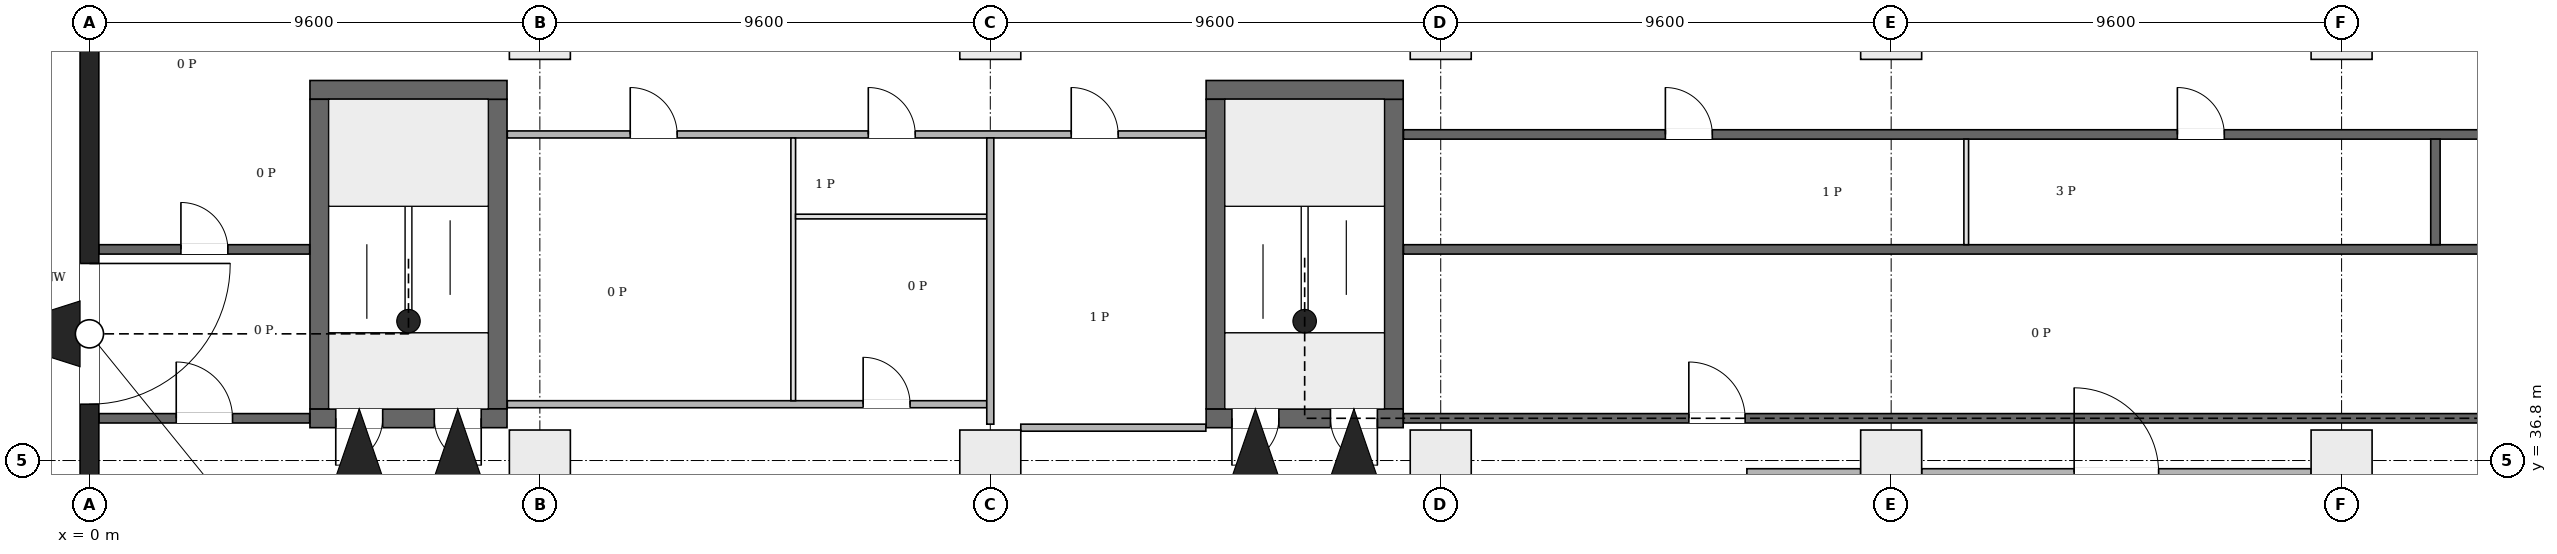
"""IFC4 building model, lengths in metres.
Left out: names, types, materials, properties, quantities, classifications, styles, units other than length and angle.
Written with IfcOpenShell. Run it as: python <this file> out.ifc"""

import sys

from ifc_helpers import new_model, si_unit, direction, frame, frame_2d, origin, origin_2d, place, context, subcontext, project, spatial, rectangle, extrude, element, fill, save


model = new_model("IFC4")
c1 = context("Model", 3, precision=1e-05, world=origin(), true_north=direction((0.0, 1.0)))
c2 = subcontext(c1, "Body", "Model", "MODEL_VIEW")
j1 = project(units=[si_unit("LENGTHUNIT", "METRE"), si_unit("PLANEANGLEUNIT", "RADIAN")], contexts=[c1])
p1 = place(None, origin())
s1 = spatial("IfcSite", under=j1, at=p1, CompositionType="ELEMENT")
p2 = place(p1, origin())
s2 = spatial("IfcBuilding", under=s1, at=p2, CompositionType="ELEMENT")
p3 = place(p2, origin())
s3 = spatial("IfcBuildingStorey", under=s2, at=p3, CompositionType="ELEMENT", Elevation=0.0)
p4 = place(p3, frame((0.0, -0.2, 0.0), z_axis=(0.0, 0.0, 1.0), x_axis=(0.0, 1.0, 0.0)))
e1 = element("IfcWall", 1, at=p4, inside=s3, PredefinedType="SHEAR", context=c2, shape_type="SweptSolid", body=[
    extrude(rectangle(XDim=46.88, YDim=0.4, at=frame_2d((23.44, 0.0))), origin(), (0.0, 0.0, 1.0), 6.5),
])
p5 = place(p4, frame((7.125, 0.0, 0.0)))
e2 = element("IfcOpeningElement", 2, at=p5, cuts=e1, PredefinedType="OPENING", context=c2, shape_type="SweptSolid", body=[
    extrude(rectangle(XDim=3.0, YDim=2.4, at=frame_2d((1.5, 1.2))), frame((0.0, 0.21, 0.0), z_axis=(0.0, -1.0, 0.0), x_axis=(1.0, 0.0, 0.0)), (0.0, 0.0, 1.0), 0.42),
])
p6 = place(p4, frame((38.2, 0.0, 0.0)))
e3 = element("IfcOpeningElement", 3, at=p6, cuts=e1, PredefinedType="OPENING", context=c2, shape_type="SweptSolid", body=[
    extrude(rectangle(XDim=3.0, YDim=2.4, at=frame_2d((1.5, 1.2))), frame((0.0, 0.21, 0.0), z_axis=(0.0, -1.0, 0.0), x_axis=(1.0, 0.0, 0.0)), (0.0, 0.0, 1.0), 0.42),
])
p7 = place(p3, frame((4.7, 37.7, 0.0), z_axis=(0.0, 0.0, 1.0), x_axis=(1.0, 0.0, 0.0)))
e4 = element("IfcWall", 4, at=p7, inside=s3, PredefinedType="SHEAR", context=c2, shape_type="SweptSolid", body=[
    extrude(rectangle(XDim=4.2, YDim=0.4, at=frame_2d((2.1, 0.0))), origin(), (0.0, 0.0, 1.0), 6.5),
])
p8 = place(p7, frame((0.55, 0.0, 0.0)))
e5 = element("IfcOpeningElement", 5, at=p8, cuts=e4, PredefinedType="OPENING", context=c2, shape_type="SweptSolid", body=[
    extrude(rectangle(XDim=1.0, YDim=2.1, at=frame_2d((0.5, 1.05))), frame((0.0, 0.21, 0.0), z_axis=(0.0, -1.0, 0.0), x_axis=(1.0, 0.0, 0.0)), (0.0, 0.0, 1.0), 0.42),
])
p9 = place(p7, frame((2.65, 0.0, 0.0)))
e6 = element("IfcOpeningElement", 6, at=p9, cuts=e4, PredefinedType="OPENING", context=c2, shape_type="SweptSolid", body=[
    extrude(rectangle(XDim=1.0, YDim=2.1, at=frame_2d((0.5, 1.05))), frame((0.0, 0.21, 0.0), z_axis=(0.0, -1.0, 0.0), x_axis=(1.0, 0.0, 0.0)), (0.0, 0.0, 1.0), 0.42),
])
p10 = place(p3, frame((4.7, 44.7, 0.0), z_axis=(0.0, 0.0, 1.0), x_axis=(1.0, 0.0, 0.0)))
e7 = element("IfcWall", 7, at=p10, inside=s3, PredefinedType="SHEAR", context=c2, shape_type="SweptSolid", body=[
    extrude(rectangle(XDim=4.2, YDim=0.4, at=frame_2d((2.1, 0.0))), origin(), (0.0, 0.0, 1.0), 6.5),
])
for number, where, z_axis, x_axis in (
    (8, (4.9, 37.9, 0.0), (0.0, 0.0, 1.0), (0.0, 1.0, 0.0)),
    (9, (8.7, 37.9, 0.0), (0.0, 0.0, 1.0), (0.0, 1.0, 0.0)),
):
    element("IfcWall", number, at=place(p3, frame(where, z_axis=z_axis, x_axis=x_axis)), inside=s3, PredefinedType="SHEAR", context=c2, shape_type="SweptSolid", body=[
        extrude(rectangle(XDim=6.6, YDim=0.4, at=frame_2d((3.3, 0.0))), origin(), (0.0, 0.0, 1.0), 6.5),
    ])
p11 = place(p3, frame((23.8, 37.7, 0.0), z_axis=(0.0, 0.0, 1.0), x_axis=(1.0, 0.0, 0.0)))
e10 = element("IfcWall", 10, at=p11, inside=s3, PredefinedType="SHEAR", context=c2, shape_type="SweptSolid", body=[
    extrude(rectangle(XDim=4.2, YDim=0.4, at=frame_2d((2.1, 0.0))), origin(), (0.0, 0.0, 1.0), 6.5),
])
p12 = place(p11, frame((0.55, 0.0, 0.0)))
e11 = element("IfcOpeningElement", 11, at=p12, cuts=e10, PredefinedType="OPENING", context=c2, shape_type="SweptSolid", body=[
    extrude(rectangle(XDim=1.0, YDim=2.1, at=frame_2d((0.5, 1.05))), frame((0.0, 0.21, 0.0), z_axis=(0.0, -1.0, 0.0), x_axis=(1.0, 0.0, 0.0)), (0.0, 0.0, 1.0), 0.42),
])
p13 = place(p11, frame((2.65, 0.0, 0.0)))
e12 = element("IfcOpeningElement", 12, at=p13, cuts=e10, PredefinedType="OPENING", context=c2, shape_type="SweptSolid", body=[
    extrude(rectangle(XDim=1.0, YDim=2.1, at=frame_2d((0.5, 1.05))), frame((0.0, 0.21, 0.0), z_axis=(0.0, -1.0, 0.0), x_axis=(1.0, 0.0, 0.0)), (0.0, 0.0, 1.0), 0.42),
])
p14 = place(p3, frame((23.8, 44.7, 0.0), z_axis=(0.0, 0.0, 1.0), x_axis=(1.0, 0.0, 0.0)))
e13 = element("IfcWall", 13, at=p14, inside=s3, PredefinedType="SHEAR", context=c2, shape_type="SweptSolid", body=[
    extrude(rectangle(XDim=4.2, YDim=0.4, at=frame_2d((2.1, 0.0))), origin(), (0.0, 0.0, 1.0), 6.5),
])
for number, where, z_axis, x_axis in (
    (14, (24.0, 37.9, 0.0), (0.0, 0.0, 1.0), (0.0, 1.0, 0.0)),
    (15, (27.8, 37.9, 0.0), (0.0, 0.0, 1.0), (0.0, 1.0, 0.0)),
):
    element("IfcWall", number, at=place(p3, frame(where, z_axis=z_axis, x_axis=x_axis)), inside=s3, PredefinedType="SHEAR", context=c2, shape_type="SweptSolid", body=[
        extrude(rectangle(XDim=6.6, YDim=0.4, at=frame_2d((3.3, 0.0))), origin(), (0.0, 0.0, 1.0), 6.5),
    ])
for number, where, z_axis, x_axis in (
    (16, (9.6, 36.8, 0.0), (0.0, 0.0, 1.0), (1.0, 0.0, 0.0)),
    (17, (19.2, 36.8, 0.0), (0.0, 0.0, 1.0), (1.0, 0.0, 0.0)),
    (18, (28.8, 36.8, 0.0), (0.0, 0.0, 1.0), (1.0, 0.0, 0.0)),
    (19, (38.4, 36.8, 0.0), (0.0, 0.0, 1.0), (1.0, 0.0, 0.0)),
    (20, (48.0, 36.8, 0.0), (0.0, 0.0, 1.0), (1.0, 0.0, 0.0)),
    (21, (9.6, 46.0, 0.0), (0.0, 0.0, 1.0), (1.0, 0.0, 0.0)),
    (22, (19.2, 46.0, 0.0), (0.0, 0.0, 1.0), (1.0, 0.0, 0.0)),
    (23, (28.8, 46.0, 0.0), (0.0, 0.0, 1.0), (1.0, 0.0, 0.0)),
    (24, (38.4, 46.0, 0.0), (0.0, 0.0, 1.0), (1.0, 0.0, 0.0)),
    (25, (48.0, 46.0, 0.0), (0.0, 0.0, 1.0), (1.0, 0.0, 0.0)),
):
    element("IfcColumn", number, at=place(p3, frame(where, z_axis=z_axis, x_axis=x_axis)), inside=s3, PredefinedType="COLUMN", context=c2, shape_type="SweptSolid", body=[
        extrude(rectangle(XDim=1.3, YDim=1.3, at=origin_2d()), origin(), (0.0, 0.0, 1.0), 6.5),
    ])
p15 = place(p3, frame((0.206, 37.7, 0.0), z_axis=(0.0, 0.0, 1.0), x_axis=(1.0, 0.0, 0.0)))
e26 = element("IfcWall", 26, at=p15, inside=s3, PredefinedType="PARTITIONING", context=c2, shape_type="SweptSolid", body=[
    extrude(rectangle(XDim=4.488, YDim=0.2, at=frame_2d((2.244, 0.0))), origin(), (0.0, 0.0, 1.0), 6.15),
])
p16 = place(p15, frame((1.644, 0.0, 0.0)))
e27 = element("IfcOpeningElement", 27, at=p16, cuts=e26, PredefinedType="OPENING", context=c2, shape_type="SweptSolid", body=[
    extrude(rectangle(XDim=1.2, YDim=2.1, at=frame_2d((0.6, 1.05))), frame((0.0, 0.11, 0.0), z_axis=(0.0, -1.0, 0.0), x_axis=(1.0, 0.0, 0.0)), (0.0, 0.0, 1.0), 0.22),
])
p17 = place(p3, frame((0.206, 41.3, 0.0), z_axis=(0.0, 0.0, 1.0), x_axis=(1.0, 0.0, 0.0)))
e28 = element("IfcWall", 28, at=p17, inside=s3, PredefinedType="PARTITIONING", context=c2, shape_type="SweptSolid", body=[
    extrude(rectangle(XDim=4.488, YDim=0.2, at=frame_2d((2.244, 0.0))), origin(), (0.0, 0.0, 1.0), 6.15),
])
p18 = place(p17, frame((1.744, 0.0, 0.0)))
e29 = element("IfcOpeningElement", 29, at=p18, cuts=e28, PredefinedType="OPENING", context=c2, shape_type="SweptSolid", body=[
    extrude(rectangle(XDim=1.0, YDim=2.1, at=frame_2d((0.5, 1.05))), frame((0.0, 0.11, 0.0), z_axis=(0.0, -1.0, 0.0), x_axis=(1.0, 0.0, 0.0)), (0.0, 0.0, 1.0), 0.22),
])
p19 = place(p3, frame((8.906, 38.0, 0.0), z_axis=(0.0, 0.0, 1.0), x_axis=(1.0, 0.0, 0.0)))
e30 = element("IfcWall", 30, at=p19, inside=s3, PredefinedType="PARTITIONING", context=c2, shape_type="SweptSolid", body=[
    extrude(rectangle(XDim=10.219, YDim=0.15, at=frame_2d((5.109, 0.0))), origin(), (0.0, 0.0, 1.0), 6.15),
])
p20 = place(p19, frame((7.584, 0.0, 0.0)))
e31 = element("IfcOpeningElement", 31, at=p20, cuts=e30, PredefinedType="OPENING", context=c2, shape_type="SweptSolid", body=[
    extrude(rectangle(XDim=1.0, YDim=2.1, at=frame_2d((0.5, 1.05))), frame((0.0, 0.085, 0.0), z_axis=(0.0, -1.0, 0.0), x_axis=(1.0, 0.0, 0.0)), (0.0, 0.0, 1.0), 0.17),
])
p21 = place(p3, frame((8.906, 43.75, 0.0), z_axis=(0.0, 0.0, 1.0), x_axis=(1.0, 0.0, 0.0)))
e32 = element("IfcWall", 32, at=p21, inside=s3, PredefinedType="PARTITIONING", context=c2, shape_type="SweptSolid", body=[
    extrude(rectangle(XDim=14.888, YDim=0.15, at=frame_2d((7.444, 0.0))), origin(), (0.0, 0.0, 1.0), 6.15),
])
p22 = place(p21, frame((2.62, 0.0, 0.0)))
e33 = element("IfcOpeningElement", 33, at=p22, cuts=e32, PredefinedType="OPENING", context=c2, shape_type="SweptSolid", body=[
    extrude(rectangle(XDim=1.0, YDim=2.1, at=frame_2d((0.5, 1.05))), frame((0.0, 0.085, 0.0), z_axis=(0.0, -1.0, 0.0), x_axis=(1.0, 0.0, 0.0)), (0.0, 0.0, 1.0), 0.17),
])
p23 = place(p21, frame((12.019, 0.0, 0.0)))
e34 = element("IfcOpeningElement", 34, at=p23, cuts=e32, PredefinedType="OPENING", context=c2, shape_type="SweptSolid", body=[
    extrude(rectangle(XDim=1.0, YDim=2.1, at=frame_2d((0.5, 1.05))), frame((0.0, 0.085, 0.0), z_axis=(0.0, -1.0, 0.0), x_axis=(1.0, 0.0, 0.0)), (0.0, 0.0, 1.0), 0.17),
])
p24 = place(p21, frame((7.694, 0.0, 0.0)))
e35 = element("IfcOpeningElement", 35, at=p24, cuts=e32, PredefinedType="OPENING", context=c2, shape_type="SweptSolid", body=[
    extrude(rectangle(XDim=1.0, YDim=2.1, at=frame_2d((0.5, 1.05))), frame((0.0, 0.085, 0.0), z_axis=(0.0, -1.0, 0.0), x_axis=(1.0, 0.0, 0.0)), (0.0, 0.0, 1.0), 0.17),
])
p25 = place(p3, frame((15.0, 38.075, 0.0), z_axis=(0.0, 0.0, 1.0), x_axis=(0.0, 1.0, 0.0)))
e36 = element("IfcWall", 36, at=p25, inside=s3, PredefinedType="PARTITIONING", context=c2, shape_type="SweptSolid", body=[
    extrude(rectangle(XDim=5.6, YDim=0.1, at=frame_2d((2.8, 0.0))), origin(), (0.0, 0.0, 1.0), 6.15),
])
p26 = place(p3, frame((15.05, 42.0, 0.0), z_axis=(0.0, 0.0, 1.0), x_axis=(1.0, 0.0, 0.0)))
e37 = element("IfcWall", 37, at=p26, inside=s3, PredefinedType="PARTITIONING", context=c2, shape_type="SweptSolid", body=[
    extrude(rectangle(XDim=4.075, YDim=0.1, at=frame_2d((2.038, 0.0))), origin(), (0.0, 0.0, 1.0), 6.15),
])
p27 = place(p3, frame((19.2, 37.575, 0.0), z_axis=(0.0, 0.0, 1.0), x_axis=(0.0, 1.0, 0.0)))
e38 = element("IfcWall", 38, at=p27, inside=s3, PredefinedType="PARTITIONING", context=c2, shape_type="SweptSolid", body=[
    extrude(rectangle(XDim=6.1, YDim=0.15, at=frame_2d((3.05, 0.0))), origin(), (0.0, 0.0, 1.0), 5.75),
])
p28 = place(p3, frame((19.85, 37.5, 0.0), z_axis=(0.0, 0.0, 1.0), x_axis=(1.0, 0.0, 0.0)))
e39 = element("IfcWall", 39, at=p28, inside=s3, PredefinedType="PARTITIONING", context=c2, shape_type="SweptSolid", body=[
    extrude(rectangle(XDim=3.944, YDim=0.15, at=frame_2d((1.972, 0.0))), origin(), (0.0, 0.0, 1.0), 6.15),
])
p29 = place(p3, frame((28.006, 37.7, 0.0), z_axis=(0.0, 0.0, 1.0), x_axis=(1.0, 0.0, 0.0)))
e40 = element("IfcWall", 40, at=p29, inside=s3, PredefinedType="PARTITIONING", context=c2, shape_type="SweptSolid", body=[
    extrude(rectangle(XDim=29.388, YDim=0.2, at=frame_2d((14.694, 0.0))), origin(), (0.0, 0.0, 1.0), 6.15),
])
p30 = place(p29, frame((24.106, 0.0, 0.0)))
e41 = element("IfcOpeningElement", 41, at=p30, cuts=e40, PredefinedType="OPENING", context=c2, shape_type="SweptSolid", body=[
    extrude(rectangle(XDim=1.0, YDim=2.1, at=frame_2d((0.5, 1.05))), frame((0.0, 0.11, 0.0), z_axis=(0.0, -1.0, 0.0), x_axis=(1.0, 0.0, 0.0)), (0.0, 0.0, 1.0), 0.22),
])
p31 = place(p29, frame((6.082, 0.0, 0.0)))
e42 = element("IfcOpeningElement", 42, at=p31, cuts=e40, PredefinedType="OPENING", context=c2, shape_type="SweptSolid", body=[
    extrude(rectangle(XDim=1.2, YDim=2.1, at=frame_2d((0.6, 1.05))), frame((0.0, 0.11, 0.0), z_axis=(0.0, -1.0, 0.0), x_axis=(1.0, 0.0, 0.0)), (0.0, 0.0, 1.0), 0.22),
])
p32 = place(p3, frame((28.006, 41.3, 0.0), z_axis=(0.0, 0.0, 1.0), x_axis=(1.0, 0.0, 0.0)))
e43 = element("IfcWall", 43, at=p32, inside=s3, PredefinedType="PARTITIONING", context=c2, shape_type="SweptSolid", body=[
    extrude(rectangle(XDim=29.388, YDim=0.2, at=frame_2d((14.694, 0.0))), origin(), (0.0, 0.0, 1.0), 6.15),
])
p33 = place(p3, frame((28.006, 43.75, 0.0), z_axis=(0.0, 0.0, 1.0), x_axis=(1.0, 0.0, 0.0)))
e44 = element("IfcWall", 44, at=p33, inside=s3, PredefinedType="PARTITIONING", context=c2, shape_type="SweptSolid", body=[
    extrude(rectangle(XDim=29.388, YDim=0.2, at=frame_2d((14.694, 0.0))), origin(), (0.0, 0.0, 1.0), 6.15),
])
p34 = place(p33, frame((5.582, 0.0, 0.0)))
e45 = element("IfcOpeningElement", 45, at=p34, cuts=e44, PredefinedType="OPENING", context=c2, shape_type="SweptSolid", body=[
    extrude(rectangle(XDim=1.0, YDim=2.1, at=frame_2d((0.5, 1.05))), frame((0.0, 0.11, 0.0), z_axis=(0.0, -1.0, 0.0), x_axis=(1.0, 0.0, 0.0)), (0.0, 0.0, 1.0), 0.22),
])
p35 = place(p33, frame((16.494, 0.0, 0.0)))
e46 = element("IfcOpeningElement", 46, at=p35, cuts=e44, PredefinedType="OPENING", context=c2, shape_type="SweptSolid", body=[
    extrude(rectangle(XDim=1.0, YDim=2.1, at=frame_2d((0.5, 1.05))), frame((0.0, 0.11, 0.0), z_axis=(0.0, -1.0, 0.0), x_axis=(1.0, 0.0, 0.0)), (0.0, 0.0, 1.0), 0.22),
])
p36 = place(p33, frame((25.106, 0.0, 0.0)))
e47 = element("IfcOpeningElement", 47, at=p36, cuts=e44, PredefinedType="OPENING", context=c2, shape_type="SweptSolid", body=[
    extrude(rectangle(XDim=1.0, YDim=2.1, at=frame_2d((0.5, 1.05))), frame((0.0, 0.11, 0.0), z_axis=(0.0, -1.0, 0.0), x_axis=(1.0, 0.0, 0.0)), (0.0, 0.0, 1.0), 0.22),
])
p37 = place(p3, frame((35.325, 36.55, 0.0), z_axis=(0.0, 0.0, 1.0), x_axis=(1.0, 0.0, 0.0)))
e48 = element("IfcWall", 48, at=p37, inside=s3, PredefinedType="PARTITIONING", context=c2, shape_type="SweptSolid", body=[
    extrude(rectangle(XDim=2.425, YDim=0.15, at=frame_2d((1.212, 0.0))), origin(), (0.0, 0.0, 1.0), 5.75),
])
p38 = place(p3, frame((39.05, 36.55, 0.0), z_axis=(0.0, 0.0, 1.0), x_axis=(1.0, 0.0, 0.0)))
e49 = element("IfcWall", 49, at=p38, inside=s3, PredefinedType="PARTITIONING", context=c2, shape_type="SweptSolid", body=[
    extrude(rectangle(XDim=8.3, YDim=0.15, at=frame_2d((4.15, 0.0))), origin(), (0.0, 0.0, 1.0), 5.75),
])
p39 = place(p38, frame((3.25, 0.0, 0.0)))
e50 = element("IfcOpeningElement", 50, at=p39, cuts=e49, PredefinedType="OPENING", context=c2, shape_type="SweptSolid", body=[
    extrude(rectangle(XDim=1.8, YDim=2.1, at=frame_2d((0.9, 1.05))), frame((0.0, 0.085, 0.0), z_axis=(0.0, -1.0, 0.0), x_axis=(1.0, 0.0, 0.0)), (0.0, 0.0, 1.0), 0.17),
])
p40 = place(p3, frame((40.0, 41.4, 0.0), z_axis=(0.0, 0.0, 1.0), x_axis=(0.0, 1.0, 0.0)))
e51 = element("IfcWall", 51, at=p40, inside=s3, PredefinedType="PARTITIONING", context=c2, shape_type="SweptSolid", body=[
    extrude(rectangle(XDim=2.25, YDim=0.1, at=frame_2d((1.125, 0.0))), origin(), (0.0, 0.0, 1.0), 6.15),
])
p41 = place(p3, frame((50.0, 41.4, 0.0), z_axis=(0.0, 0.0, 1.0), x_axis=(0.0, 1.0, 0.0)))
e52 = element("IfcWall", 52, at=p41, inside=s3, PredefinedType="PARTITIONING", context=c2, shape_type="SweptSolid", body=[
    extrude(rectangle(XDim=2.25, YDim=0.2, at=frame_2d((1.125, 0.0))), origin(), (0.0, 0.0, 1.0), 6.15),
])
p42 = place(p6, origin())
e53 = element("IfcDoor", 53, at=p42, inside=s3, OperationType="DOUBLE_DOOR_SINGLE_SWING", PredefinedType="DOOR", context=c2, shape_type="SweptSolid", body=[
    extrude(rectangle(XDim=3.0, YDim=2.4, at=frame_2d((1.5, 1.2))), frame((0.0, 0.025, 0.0), z_axis=(0.0, -1.0, 0.0), x_axis=(1.0, 0.0, 0.0)), (0.0, 0.0, 1.0), 0.05),
])
fill(e3, e53)
p43 = place(p8, origin())
e54 = element("IfcDoor", 54, at=p43, inside=s3, OperationType="SINGLE_SWING_LEFT", PredefinedType="DOOR", context=c2, shape_type="SweptSolid", body=[
    extrude(rectangle(XDim=1.0, YDim=2.1, at=frame_2d((0.5, 1.05))), frame((0.0, 0.025, 0.0), z_axis=(0.0, -1.0, 0.0), x_axis=(1.0, 0.0, 0.0)), (0.0, 0.0, 1.0), 0.05),
])
fill(e5, e54)
p44 = place(p9, origin())
e55 = element("IfcDoor", 55, at=p44, inside=s3, OperationType="SINGLE_SWING_RIGHT", PredefinedType="DOOR", context=c2, shape_type="SweptSolid", body=[
    extrude(rectangle(XDim=1.0, YDim=2.1, at=frame_2d((0.5, 1.05))), frame((0.0, 0.025, 0.0), z_axis=(0.0, -1.0, 0.0), x_axis=(1.0, 0.0, 0.0)), (0.0, 0.0, 1.0), 0.05),
])
fill(e6, e55)
p45 = place(p12, origin())
e56 = element("IfcDoor", 56, at=p45, inside=s3, OperationType="SINGLE_SWING_LEFT", PredefinedType="DOOR", context=c2, shape_type="SweptSolid", body=[
    extrude(rectangle(XDim=1.0, YDim=2.1, at=frame_2d((0.5, 1.05))), frame((0.0, 0.025, 0.0), z_axis=(0.0, -1.0, 0.0), x_axis=(1.0, 0.0, 0.0)), (0.0, 0.0, 1.0), 0.05),
])
fill(e11, e56)
p46 = place(p13, origin())
e57 = element("IfcDoor", 57, at=p46, inside=s3, OperationType="SINGLE_SWING_RIGHT", PredefinedType="DOOR", context=c2, shape_type="SweptSolid", body=[
    extrude(rectangle(XDim=1.0, YDim=2.1, at=frame_2d((0.5, 1.05))), frame((0.0, 0.025, 0.0), z_axis=(0.0, -1.0, 0.0), x_axis=(1.0, 0.0, 0.0)), (0.0, 0.0, 1.0), 0.05),
])
fill(e12, e57)
p47 = place(p22, origin())
e58 = element("IfcDoor", 58, at=p47, inside=s3, OperationType="SINGLE_SWING_RIGHT", PredefinedType="DOOR", context=c2, shape_type="SweptSolid", body=[
    extrude(rectangle(XDim=1.0, YDim=2.1, at=frame_2d((0.5, 1.05))), frame((0.0, 0.025, 0.0), z_axis=(0.0, -1.0, 0.0), x_axis=(1.0, 0.0, 0.0)), (0.0, 0.0, 1.0), 0.05),
])
fill(e33, e58)
p48 = place(p20, origin())
e59 = element("IfcDoor", 59, at=p48, inside=s3, OperationType="SINGLE_SWING_RIGHT", PredefinedType="DOOR", context=c2, shape_type="SweptSolid", body=[
    extrude(rectangle(XDim=1.0, YDim=2.1, at=frame_2d((0.5, 1.05))), frame((0.0, 0.025, 0.0), z_axis=(0.0, -1.0, 0.0), x_axis=(1.0, 0.0, 0.0)), (0.0, 0.0, 1.0), 0.05),
])
fill(e31, e59)
p49 = place(p23, origin())
e60 = element("IfcDoor", 60, at=p49, inside=s3, OperationType="SINGLE_SWING_LEFT", PredefinedType="DOOR", context=c2, shape_type="SweptSolid", body=[
    extrude(rectangle(XDim=1.0, YDim=2.1, at=frame_2d((0.5, 1.05))), frame((0.0, 0.025, 0.0), z_axis=(0.0, -1.0, 0.0), x_axis=(1.0, 0.0, 0.0)), (0.0, 0.0, 1.0), 0.05),
])
fill(e34, e60)
p50 = place(p39, origin())
e61 = element("IfcDoor", 61, at=p50, inside=s3, OperationType="DOUBLE_DOOR_SINGLE_SWING", PredefinedType="DOOR", context=c2, shape_type="SweptSolid", body=[
    extrude(rectangle(XDim=1.8, YDim=2.1, at=frame_2d((0.9, 1.05))), frame((0.0, 0.025, 0.0), z_axis=(0.0, -1.0, 0.0), x_axis=(1.0, 0.0, 0.0)), (0.0, 0.0, 1.0), 0.05),
])
fill(e50, e61)
p51 = place(p24, origin())
e62 = element("IfcDoor", 62, at=p51, inside=s3, OperationType="SINGLE_SWING_LEFT", PredefinedType="DOOR", context=c2, shape_type="SweptSolid", body=[
    extrude(rectangle(XDim=1.0, YDim=2.1, at=frame_2d((0.5, 1.05))), frame((0.0, 0.025, 0.0), z_axis=(0.0, -1.0, 0.0), x_axis=(1.0, 0.0, 0.0)), (0.0, 0.0, 1.0), 0.05),
])
fill(e35, e62)
p52 = place(p34, origin())
e63 = element("IfcDoor", 63, at=p52, inside=s3, OperationType="SINGLE_SWING_RIGHT", PredefinedType="DOOR", context=c2, shape_type="SweptSolid", body=[
    extrude(rectangle(XDim=1.0, YDim=2.1, at=frame_2d((0.5, 1.05))), frame((0.0, 0.025, 0.0), z_axis=(0.0, -1.0, 0.0), x_axis=(1.0, 0.0, 0.0)), (0.0, 0.0, 1.0), 0.05),
])
fill(e45, e63)
p53 = place(p35, origin())
e64 = element("IfcDoor", 64, at=p53, inside=s3, OperationType="SINGLE_SWING_LEFT", PredefinedType="DOOR", context=c2, shape_type="SweptSolid", body=[
    extrude(rectangle(XDim=1.0, YDim=2.1, at=frame_2d((0.5, 1.05))), frame((0.0, 0.025, 0.0), z_axis=(0.0, -1.0, 0.0), x_axis=(1.0, 0.0, 0.0)), (0.0, 0.0, 1.0), 0.05),
])
fill(e46, e64)
p54 = place(p16, origin())
e65 = element("IfcDoor", 65, at=p54, inside=s3, OperationType="SINGLE_SWING_RIGHT", PredefinedType="DOOR", context=c2, shape_type="SweptSolid", body=[
    extrude(rectangle(XDim=1.2, YDim=2.1, at=frame_2d((0.6, 1.05))), frame((0.0, 0.025, 0.0), z_axis=(0.0, -1.0, 0.0), x_axis=(1.0, 0.0, 0.0)), (0.0, 0.0, 1.0), 0.05),
])
fill(e27, e65)
p55 = place(p31, origin())
e66 = element("IfcDoor", 66, at=p55, inside=s3, OperationType="SINGLE_SWING_LEFT", PredefinedType="DOOR", context=c2, shape_type="SweptSolid", body=[
    extrude(rectangle(XDim=1.2, YDim=2.1, at=frame_2d((0.6, 1.05))), frame((0.0, 0.025, 0.0), z_axis=(0.0, -1.0, 0.0), x_axis=(1.0, 0.0, 0.0)), (0.0, 0.0, 1.0), 0.05),
])
fill(e42, e66)
p56 = place(p18, origin())
e67 = element("IfcDoor", 67, at=p56, inside=s3, OperationType="SINGLE_SWING_RIGHT", PredefinedType="DOOR", context=c2, shape_type="SweptSolid", body=[
    extrude(rectangle(XDim=1.0, YDim=2.1, at=frame_2d((0.5, 1.05))), frame((0.0, 0.025, 0.0), z_axis=(0.0, -1.0, 0.0), x_axis=(1.0, 0.0, 0.0)), (0.0, 0.0, 1.0), 0.05),
])
fill(e29, e67)
save(model, sys.argv[1])
